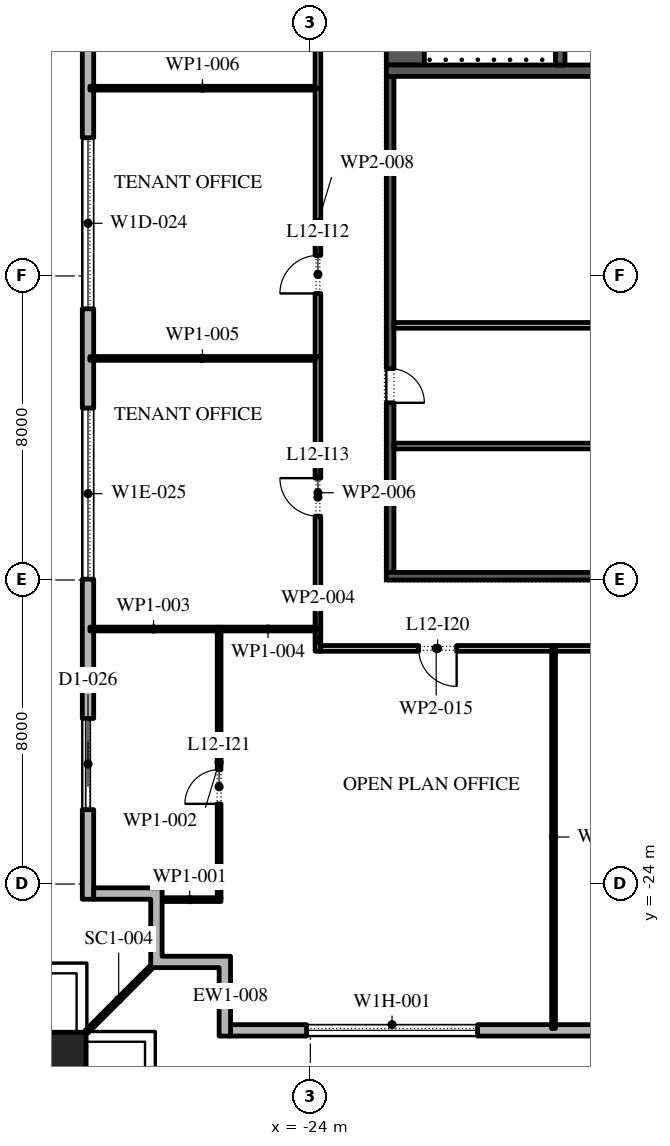
"""IFC4 building model, lengths in metres.
Left out: names, types, materials, properties, quantities, classifications, styles, units other than length and angle.
Written with IfcOpenShell. Run it as: python <this file> out.ifc"""

import sys

from ifc_helpers import new_model, si_unit, direction, frame, frame_2d, origin, origin_2d, place, context, subcontext, project, spatial, polyline, rectangle, outline, extrude, element, fill, save


model = new_model("IFC4")
c1 = context("Model", 3, precision=1e-05, world=origin(), true_north=direction((0.0, 1.0)))
c2 = subcontext(c1, "Body", "Model", "MODEL_VIEW")
j1 = project(units=[si_unit("LENGTHUNIT", "METRE"), si_unit("PLANEANGLEUNIT", "RADIAN")], contexts=[c1])
p1 = place(None, origin())
s1 = spatial("IfcSite", under=j1, at=p1, CompositionType="ELEMENT")
p2 = place(p1, origin())
s2 = spatial("IfcBuilding", under=s1, at=p2, CompositionType="ELEMENT")
p3 = place(p2, frame((0.0, 0.0, 60.6)))
s3 = spatial("IfcBuildingStorey", under=s2, at=p3, CompositionType="ELEMENT", Elevation=60.6)
p4 = place(p3, frame((-30.6, -28.6, 0.0), z_axis=(0.0, 0.0, 1.0), x_axis=(1.0, 0.0, 0.0)))
e1 = element("IfcColumn", 1, at=p4, inside=s3, PredefinedType="COLUMN", context=c2, shape_type="SweptSolid", body=[
    extrude(rectangle(XDim=1.4, YDim=1.4, at=origin_2d()), origin(), (0.0, 0.0, 1.0), 4.2),
])
p5 = place(p3, frame((-26.1, -27.85, 0.0), z_axis=(0.0, 0.0, 1.0), x_axis=(1.0, 0.0, 0.0)))
e2 = element("IfcWall", 2, at=p5, inside=s3, PredefinedType="STANDARD", context=c2, shape_type="SweptSolid", body=[
    extrude(rectangle(XDim=52.5, YDim=0.3, at=frame_2d((26.25, 0.0))), origin(), (0.0, 0.0, 1.0), 4.0),
])
p6 = place(p5, frame((2.0, 0.0, 0.45)))
e3 = element("IfcOpeningElement", 3, at=p6, cuts=e2, PredefinedType="OPENING", context=c2, shape_type="SweptSolid", body=[
    extrude(rectangle(XDim=4.5, YDim=2.75, at=frame_2d((2.25, 1.375))), frame((0.0, 0.16, 0.0), z_axis=(0.0, -1.0, 0.0), x_axis=(1.0, 0.0, 0.0)), (0.0, 0.0, 1.0), 0.32),
])
p7 = place(p5, frame((10.65, 0.0, 0.45)))
e4 = element("IfcOpeningElement", 4, at=p7, cuts=e2, PredefinedType="OPENING", context=c2, shape_type="SweptSolid", body=[
    extrude(rectangle(XDim=4.5, YDim=2.75, at=frame_2d((2.25, 1.375))), frame((0.0, 0.16, 0.0), z_axis=(0.0, -1.0, 0.0), x_axis=(1.0, 0.0, 0.0)), (0.0, 0.0, 1.0), 0.32),
])
p8 = place(p5, frame((20.5, 0.0, 0.0)))
e5 = element("IfcOpeningElement", 5, at=p8, cuts=e2, PredefinedType="OPENING", context=c2, shape_type="SweptSolid", body=[
    extrude(rectangle(XDim=2.4, YDim=3.5, at=frame_2d((1.2, 1.75))), frame((0.0, 0.16, 0.0), z_axis=(0.0, -1.0, 0.0), x_axis=(1.0, 0.0, 0.0)), (0.0, 0.0, 1.0), 0.32),
])
p9 = place(p5, frame((28.25, 0.0, 0.45)))
e6 = element("IfcOpeningElement", 6, at=p9, cuts=e2, PredefinedType="OPENING", context=c2, shape_type="SweptSolid", body=[
    extrude(rectangle(XDim=4.5, YDim=2.75, at=frame_2d((2.25, 1.375))), frame((0.0, 0.16, 0.0), z_axis=(0.0, -1.0, 0.0), x_axis=(1.0, 0.0, 0.0)), (0.0, 0.0, 1.0), 0.32),
])
p10 = place(p5, frame((37.05, 0.0, 0.45)))
e7 = element("IfcOpeningElement", 7, at=p10, cuts=e2, PredefinedType="OPENING", context=c2, shape_type="SweptSolid", body=[
    extrude(rectangle(XDim=4.5, YDim=2.75, at=frame_2d((2.25, 1.375))), frame((0.0, 0.16, 0.0), z_axis=(0.0, -1.0, 0.0), x_axis=(1.0, 0.0, 0.0)), (0.0, 0.0, 1.0), 0.32),
])
p11 = place(p5, frame((45.85, 0.0, 0.45)))
e8 = element("IfcOpeningElement", 8, at=p11, cuts=e2, PredefinedType="OPENING", context=c2, shape_type="SweptSolid", body=[
    extrude(rectangle(XDim=4.5, YDim=2.75, at=frame_2d((2.25, 1.375))), frame((0.0, 0.16, 0.0), z_axis=(0.0, -1.0, 0.0), x_axis=(1.0, 0.0, 0.0)), (0.0, 0.0, 1.0), 0.32),
])
p12 = place(p3, frame((-29.85, 25.1, 0.0), z_axis=(0.0, 0.0, 1.0), x_axis=(0.0, -1.0, 0.0)))
e9 = element("IfcWall", 9, at=p12, inside=s3, PredefinedType="STANDARD", context=c2, shape_type="SweptSolid", body=[
    extrude(rectangle(XDim=49.5, YDim=0.3, at=frame_2d((24.75, 0.0))), origin(), (0.0, 0.0, 1.0), 4.0),
])
p13 = place(p12, frame((1.157, 0.0, 0.45)))
e10 = element("IfcOpeningElement", 10, at=p13, cuts=e9, PredefinedType="OPENING", context=c2, shape_type="SweptSolid", body=[
    extrude(rectangle(XDim=4.5, YDim=2.875, at=frame_2d((2.25, 1.438))), frame((0.0, 0.16, 0.0), z_axis=(0.0, -1.0, 0.0), x_axis=(1.0, 0.0, 0.0)), (0.0, 0.0, 1.0), 0.32),
])
p14 = place(p12, frame((8.121, 0.0, 0.45)))
e11 = element("IfcOpeningElement", 11, at=p14, cuts=e9, PredefinedType="OPENING", context=c2, shape_type="SweptSolid", body=[
    extrude(rectangle(XDim=4.5, YDim=3.05, at=frame_2d((2.25, 1.525))), frame((0.0, 0.16, 0.0), z_axis=(0.0, -1.0, 0.0), x_axis=(1.0, 0.0, 0.0)), (0.0, 0.0, 1.0), 0.32),
])
p15 = place(p12, frame((16.286, 0.0, 0.0)))
e12 = element("IfcOpeningElement", 12, at=p15, cuts=e9, PredefinedType="OPENING", context=c2, shape_type="SweptSolid", body=[
    extrude(rectangle(XDim=2.4, YDim=3.325, at=frame_2d((1.2, 1.663))), frame((0.0, 0.16, 0.0), z_axis=(0.0, -1.0, 0.0), x_axis=(1.0, 0.0, 0.0)), (0.0, 0.0, 1.0), 0.32),
])
p16 = place(p12, frame((22.35, 0.0, 0.45)))
e13 = element("IfcOpeningElement", 13, at=p16, cuts=e9, PredefinedType="OPENING", context=c2, shape_type="SweptSolid", body=[
    extrude(rectangle(XDim=4.5, YDim=2.875, at=frame_2d((2.25, 1.438))), frame((0.0, 0.16, 0.0), z_axis=(0.0, -1.0, 0.0), x_axis=(1.0, 0.0, 0.0)), (0.0, 0.0, 1.0), 0.32),
])
p17 = place(p12, frame((29.464, 0.0, 0.45)))
e14 = element("IfcOpeningElement", 14, at=p17, cuts=e9, PredefinedType="OPENING", context=c2, shape_type="SweptSolid", body=[
    extrude(rectangle(XDim=4.5, YDim=2.875, at=frame_2d((2.25, 1.438))), frame((0.0, 0.16, 0.0), z_axis=(0.0, -1.0, 0.0), x_axis=(1.0, 0.0, 0.0)), (0.0, 0.0, 1.0), 0.32),
])
p18 = place(p12, frame((36.579, 0.0, 0.45)))
e15 = element("IfcOpeningElement", 15, at=p18, cuts=e9, PredefinedType="OPENING", context=c2, shape_type="SweptSolid", body=[
    extrude(rectangle(XDim=4.5, YDim=2.825, at=frame_2d((2.25, 1.413))), frame((0.0, 0.16, 0.0), z_axis=(0.0, -1.0, 0.0), x_axis=(1.0, 0.0, 0.0)), (0.0, 0.0, 1.0), 0.32),
])
p19 = place(p12, frame((44.743, 0.0, 0.0)))
e16 = element("IfcOpeningElement", 16, at=p19, cuts=e9, PredefinedType="OPENING", context=c2, shape_type="SweptSolid", body=[
    extrude(rectangle(XDim=2.4, YDim=3.5, at=frame_2d((1.2, 1.75))), frame((0.0, 0.16, 0.0), z_axis=(0.0, -1.0, 0.0), x_axis=(1.0, 0.0, 0.0)), (0.0, 0.0, 1.0), 0.32),
])
p20 = place(p3, origin())
e17 = element("IfcWall", 17, at=p20, inside=s3, PredefinedType="STANDARD", context=c2, shape_type="SweptSolid", body=[
    extrude(outline(polyline([(-26.4, -26.2), (-28.2, -26.2), (-28.2, -24.4), (-29.7, -24.4), (-29.7, -24.1), (-27.9, -24.1), (-27.9, -25.9), (-26.1, -25.9), (-26.1, -28.0), (-26.4, -28.0), (-26.4, -26.2)])), origin(), (0.0, 0.0, 1.0), 4.0),
])
p21 = place(p3, frame((-28.2, -26.2, -0.05), z_axis=(0.0, 0.0, 1.0), x_axis=(-0.707106781187, -0.707106781187, 0.0)))
e18 = element("IfcWall", 18, at=p21, inside=s3, PredefinedType="STANDARD", context=c2, shape_type="SweptSolid", body=[
    extrude(rectangle(XDim=2.385, YDim=0.1, at=frame_2d((1.192, 0.0))), origin(), (0.0, 0.0, 1.0), 4.05),
])
p22 = place(p3, frame((-21.5, -2.45, 0.0), z_axis=(0.0, 0.0, 1.0), x_axis=(0.0, 1.0, 0.0)))
e19 = element("IfcWall", 19, at=p22, inside=s3, PredefinedType="SHEAR", context=c2, shape_type="SweptSolid", body=[
    extrude(rectangle(XDim=27.9, YDim=1.0, at=frame_2d((13.95, 0.0))), origin(), (0.0, 0.0, 1.0), 4.0),
])
p23 = place(p22, frame((5.05, 0.0, 0.0)))
e20 = element("IfcOpeningElement", 20, at=p23, cuts=e19, PredefinedType="OPENING", context=c2, shape_type="SweptSolid", body=[
    extrude(rectangle(XDim=1.2, YDim=2.1, at=frame_2d((0.6, 1.05))), frame((0.0, 0.51, 0.0), z_axis=(0.0, -1.0, 0.0), x_axis=(1.0, 0.0, 0.0)), (0.0, 0.0, 1.0), 1.02),
])
p24 = place(p22, frame((21.65, 0.0, 0.0)))
e21 = element("IfcOpeningElement", 21, at=p24, cuts=e19, PredefinedType="OPENING", context=c2, shape_type="SweptSolid", body=[
    extrude(rectangle(XDim=1.2, YDim=2.1, at=frame_2d((0.6, 1.05))), frame((0.0, 0.51, 0.0), z_axis=(0.0, -1.0, 0.0), x_axis=(1.0, 0.0, 0.0)), (0.0, 0.0, 1.0), 1.02),
])
p25 = place(p3, frame((-22.0, -2.6, 0.0), z_axis=(0.0, 0.0, 1.0), x_axis=(1.0, 0.0, 0.0)))
e22 = element("IfcWall", 22, at=p25, inside=s3, PredefinedType="SHEAR", context=c2, shape_type="SweptSolid", body=[
    extrude(rectangle(XDim=12.0, YDim=0.3, at=frame_2d((6.0, 0.0))), origin(), (0.0, 0.0, 1.0), 4.0),
])
p26 = place(p3, frame((-17.425, -2.45, 0.0), z_axis=(0.0, 0.0, 1.0), x_axis=(0.0, 1.0, 0.0)))
e23 = element("IfcWall", 23, at=p26, inside=s3, PredefinedType="SHEAR", context=c2, shape_type="SweptSolid", body=[
    extrude(rectangle(XDim=6.3, YDim=0.25, at=frame_2d((3.15, 0.0))), origin(), (0.0, 0.0, 1.0), 4.0),
])
p27 = place(p26, frame((5.05, 0.0, 0.0)))
e24 = element("IfcOpeningElement", 24, at=p27, cuts=e23, PredefinedType="OPENING", context=c2, shape_type="SweptSolid", body=[
    extrude(rectangle(XDim=1.2, YDim=2.1, at=frame_2d((0.6, 1.05))), frame((0.0, 0.135, 0.0), z_axis=(0.0, -1.0, 0.0), x_axis=(1.0, 0.0, 0.0)), (0.0, 0.0, 1.0), 0.27),
])
p28 = place(p3, frame((-21.9, -15.8, 0.0), z_axis=(0.0, 0.0, 1.0), x_axis=(0.0, 1.0, 0.0)))
e25 = element("IfcWall", 25, at=p28, inside=s3, PredefinedType="SHEAR", context=c2, shape_type="SweptSolid", body=[
    extrude(rectangle(XDim=13.05, YDim=0.2, at=frame_2d((6.525, 0.0))), origin(), (0.0, 0.0, 1.0), 4.0),
])
p29 = place(p28, frame((4.462, 0.0, 0.0)))
e26 = element("IfcOpeningElement", 26, at=p29, cuts=e25, PredefinedType="OPENING", context=c2, shape_type="SweptSolid", body=[
    extrude(rectangle(XDim=0.9, YDim=2.1, at=frame_2d((0.45, 1.05))), frame((0.0, 0.11, 0.0), z_axis=(0.0, -1.0, 0.0), x_axis=(1.0, 0.0, 0.0)), (0.0, 0.0, 1.0), 0.22),
])
p30 = place(p3, frame((-22.0, -15.9, 0.0), z_axis=(0.0, 0.0, 1.0), x_axis=(1.0, 0.0, 0.0)))
e27 = element("IfcWall", 27, at=p30, inside=s3, PredefinedType="SHEAR", context=c2, shape_type="SweptSolid", body=[
    extrude(rectangle(XDim=12.0, YDim=0.2, at=frame_2d((6.0, 0.0))), origin(), (0.0, 0.0, 1.0), 4.0),
])
for number, where, z_axis, x_axis in (
    (28, (-21.8, -9.3, 0.0), (0.0, 0.0, 1.0), (1.0, 0.0, 0.0)),
    (29, (-21.8, -12.475, 0.0), (0.0, 0.0, 1.0), (1.0, 0.0, 0.0)),
):
    element("IfcWall", number, at=place(p3, frame(where, z_axis=z_axis, x_axis=x_axis)), inside=s3, PredefinedType="PARTITIONING", context=c2, shape_type="SweptSolid", body=[
        extrude(rectangle(XDim=11.6, YDim=0.15, at=frame_2d((5.8, 0.0))), origin(), (0.0, 0.0, 1.0), 4.0),
    ])
p31 = place(p3, frame((-28.0, -24.41, 0.0), z_axis=(0.0, 0.0, 1.0), x_axis=(1.0, 0.0, 0.0)))
e30 = element("IfcWall", 30, at=p31, inside=s3, PredefinedType="PARTITIONING", context=c2, shape_type="SweptSolid", body=[
    extrude(rectangle(XDim=1.65, YDim=0.1, at=frame_2d((0.825, 0.0))), origin(), (0.0, 0.0, 1.0), 4.0),
])
p32 = place(p3, frame((-26.4, -24.36, 0.0), z_axis=(0.0, 0.0, 1.0), x_axis=(0.0, 1.0, 0.0)))
e31 = element("IfcWall", 31, at=p32, inside=s3, PredefinedType="PARTITIONING", context=c2, shape_type="SweptSolid", body=[
    extrude(rectangle(XDim=7.12, YDim=0.1, at=frame_2d((3.56, 0.0))), origin(), (0.0, 0.0, 1.0), 4.0),
])
p33 = place(p32, frame((2.47, 0.0, 0.0)))
e32 = element("IfcOpeningElement", 32, at=p33, cuts=e31, PredefinedType="OPENING", context=c2, shape_type="SweptSolid", body=[
    extrude(rectangle(XDim=0.9, YDim=2.1, at=frame_2d((0.45, 1.05))), frame((0.0, 0.06, 0.0), z_axis=(0.0, -1.0, 0.0), x_axis=(1.0, 0.0, 0.0)), (0.0, 0.0, 1.0), 0.12),
])
p34 = place(p3, frame((-26.45, -17.29, 0.0), z_axis=(0.0, 0.0, 1.0), x_axis=(-1.0, 0.0, 0.0)))
e33 = element("IfcWall", 33, at=p34, inside=s3, PredefinedType="PARTITIONING", context=c2, shape_type="SweptSolid", body=[
    extrude(rectangle(XDim=3.35, YDim=0.1, at=frame_2d((1.675, 0.0))), origin(), (0.0, 0.0, 1.0), 4.0),
])
p35 = place(p3, frame((-23.8, -17.875, 0.0), z_axis=(0.0, 0.0, 1.0), x_axis=(0.0, 1.0, 0.0)))
e34 = element("IfcWall", 34, at=p35, inside=s3, PredefinedType="PARTITIONING", context=c2, shape_type="SweptSolid", body=[
    extrude(rectangle(XDim=0.585, YDim=0.15, at=frame_2d((0.292, 0.0))), origin(), (0.0, 0.0, 1.0), 4.0),
])
p36 = place(p3, frame((-23.875, -17.29, 0.0), z_axis=(0.0, 0.0, 1.0), x_axis=(-1.0, 0.0, 0.0)))
e35 = element("IfcWall", 35, at=p36, inside=s3, PredefinedType="PARTITIONING", context=c2, shape_type="SweptSolid", body=[
    extrude(rectangle(XDim=2.475, YDim=0.1, at=frame_2d((1.238, 0.0))), origin(), (0.0, 0.0, 1.0), 4.0),
])
p37 = place(p3, frame((-23.8, -17.29, 0.0), z_axis=(0.0, 0.0, 1.0), x_axis=(0.0, 1.0, 0.0)))
e36 = element("IfcWall", 36, at=p37, inside=s3, PredefinedType="PARTITIONING", context=c2, shape_type="SweptSolid", body=[
    extrude(rectangle(XDim=7.17, YDim=0.15, at=frame_2d((3.585, 0.0))), origin(), (0.0, 0.0, 1.0), 4.0),
])
p38 = place(p37, frame((2.97, 0.0, 0.0)))
e37 = element("IfcOpeningElement", 37, at=p38, cuts=e36, PredefinedType="OPENING", context=c2, shape_type="SweptSolid", body=[
    extrude(rectangle(XDim=1.0, YDim=2.1, at=frame_2d((0.5, 1.05))), frame((0.0, 0.085, 0.0), z_axis=(0.0, -1.0, 0.0), x_axis=(1.0, 0.0, 0.0)), (0.0, 0.0, 1.0), 0.17),
])
p39 = place(p3, frame((-23.875, -10.17, 0.0), z_axis=(0.0, 0.0, 1.0), x_axis=(-1.0, 0.0, 0.0)))
e38 = element("IfcWall", 38, at=p39, inside=s3, PredefinedType="PARTITIONING", context=c2, shape_type="SweptSolid", body=[
    extrude(rectangle(XDim=5.925, YDim=0.1, at=frame_2d((2.962, 0.0))), origin(), (0.0, 0.0, 1.0), 4.0),
])
p40 = place(p3, frame((-23.8, -10.12, 0.0), z_axis=(0.0, 0.0, 1.0), x_axis=(0.0, 1.0, 0.0)))
e39 = element("IfcWall", 39, at=p40, inside=s3, PredefinedType="PARTITIONING", context=c2, shape_type="SweptSolid", body=[
    extrude(rectangle(XDim=7.06, YDim=0.15, at=frame_2d((3.53, 0.0))), origin(), (0.0, 0.0, 1.0), 4.0),
])
p41 = place(p40, frame((1.66, 0.0, 0.0)))
e40 = element("IfcOpeningElement", 40, at=p41, cuts=e39, PredefinedType="OPENING", context=c2, shape_type="SweptSolid", body=[
    extrude(rectangle(XDim=1.0, YDim=2.1, at=frame_2d((0.5, 1.05))), frame((0.0, 0.085, 0.0), z_axis=(0.0, -1.0, 0.0), x_axis=(1.0, 0.0, 0.0)), (0.0, 0.0, 1.0), 0.17),
])
p42 = place(p3, frame((-23.875, -3.06, 0.0), z_axis=(0.0, 0.0, 1.0), x_axis=(-1.0, 0.0, 0.0)))
e41 = element("IfcWall", 41, at=p42, inside=s3, PredefinedType="PARTITIONING", context=c2, shape_type="SweptSolid", body=[
    extrude(rectangle(XDim=5.925, YDim=0.1, at=frame_2d((2.962, 0.0))), origin(), (0.0, 0.0, 1.0), 4.0),
])
p43 = place(p3, frame((-23.8, -3.06, 0.0), z_axis=(0.0, 0.0, 1.0), x_axis=(0.0, 1.0, 0.0)))
e42 = element("IfcWall", 42, at=p43, inside=s3, PredefinedType="PARTITIONING", context=c2, shape_type="SweptSolid", body=[
    extrude(rectangle(XDim=14.23, YDim=0.15, at=frame_2d((7.115, 0.0))), origin(), (0.0, 0.0, 1.0), 4.0),
])
p44 = place(p43, frame((8.08, 0.0, 0.0)))
e43 = element("IfcOpeningElement", 43, at=p44, cuts=e42, PredefinedType="OPENING", context=c2, shape_type="SweptSolid", body=[
    extrude(rectangle(XDim=1.0, YDim=2.1, at=frame_2d((0.5, 1.05))), frame((0.0, 0.085, 0.0), z_axis=(0.0, -1.0, 0.0), x_axis=(1.0, 0.0, 0.0)), (0.0, 0.0, 1.0), 0.17),
])
p45 = place(p3, frame((-17.6, -27.8, 0.0), z_axis=(0.0, 0.0, 1.0), x_axis=(0.0, 1.0, 0.0)))
e44 = element("IfcWall", 44, at=p45, inside=s3, PredefinedType="PARTITIONING", context=c2, shape_type="SweptSolid", body=[
    extrude(rectangle(XDim=10.075, YDim=0.1, at=frame_2d((5.038, 0.0))), origin(), (0.0, 0.0, 1.0), 4.0),
])
p46 = place(p3, frame((-17.65, -17.8, 0.0), z_axis=(0.0, 0.0, 1.0), x_axis=(-1.0, 0.0, 0.0)))
e45 = element("IfcWall", 45, at=p46, inside=s3, PredefinedType="PARTITIONING", context=c2, shape_type="SweptSolid", body=[
    extrude(rectangle(XDim=6.075, YDim=0.15, at=frame_2d((3.038, 0.0))), origin(), (0.0, 0.0, 1.0), 4.0),
])
p47 = place(p46, frame((2.5, 0.0, 0.0)))
e46 = element("IfcOpeningElement", 46, at=p47, cuts=e45, PredefinedType="OPENING", context=c2, shape_type="SweptSolid", body=[
    extrude(rectangle(XDim=1.0, YDim=2.1, at=frame_2d((0.5, 1.05))), frame((0.0, 0.085, 0.0), z_axis=(0.0, -1.0, 0.0), x_axis=(1.0, 0.0, 0.0)), (0.0, 0.0, 1.0), 0.17),
])
p48 = place(p3, frame((-8.85, -17.8, 0.0), z_axis=(0.0, 0.0, 1.0), x_axis=(-1.0, 0.0, 0.0)))
e47 = element("IfcWall", 47, at=p48, inside=s3, PredefinedType="PARTITIONING", context=c2, shape_type="SweptSolid", body=[
    extrude(rectangle(XDim=8.7, YDim=0.15, at=frame_2d((4.35, 0.0))), origin(), (0.0, 0.0, 1.0), 4.0),
])
p49 = place(p48, frame((5.6, 0.0, 0.0)))
e48 = element("IfcOpeningElement", 48, at=p49, cuts=e47, PredefinedType="OPENING", context=c2, shape_type="SweptSolid", body=[
    extrude(rectangle(XDim=1.0, YDim=2.1, at=frame_2d((0.5, 1.05))), frame((0.0, 0.085, 0.0), z_axis=(0.0, -1.0, 0.0), x_axis=(1.0, 0.0, 0.0)), (0.0, 0.0, 1.0), 0.17),
])
p50 = place(p6, origin())
e49 = element("IfcWindow", 49, at=p50, inside=s3, PartitioningType="DOUBLE_PANEL_VERTICAL", PredefinedType="WINDOW", context=c2, shape_type="SweptSolid", body=[
    extrude(rectangle(XDim=4.5, YDim=2.75, at=frame_2d((2.25, 1.375))), frame((0.0, 0.03, 0.0), z_axis=(0.0, -1.0, 0.0), x_axis=(1.0, 0.0, 0.0)), (0.0, 0.0, 1.0), 0.06),
])
fill(e3, e49)
p51 = place(p17, origin())
e50 = element("IfcWindow", 50, at=p51, inside=s3, PartitioningType="DOUBLE_PANEL_VERTICAL", PredefinedType="WINDOW", context=c2, shape_type="SweptSolid", body=[
    extrude(rectangle(XDim=4.5, YDim=2.875, at=frame_2d((2.25, 1.438))), frame((0.0, 0.03, 0.0), z_axis=(0.0, -1.0, 0.0), x_axis=(1.0, 0.0, 0.0)), (0.0, 0.0, 1.0), 0.06),
])
fill(e14, e50)
p52 = place(p18, origin())
e51 = element("IfcWindow", 51, at=p52, inside=s3, PartitioningType="DOUBLE_PANEL_VERTICAL", PredefinedType="WINDOW", context=c2, shape_type="SweptSolid", body=[
    extrude(rectangle(XDim=4.5, YDim=2.825, at=frame_2d((2.25, 1.413))), frame((0.0, 0.03, 0.0), z_axis=(0.0, -1.0, 0.0), x_axis=(1.0, 0.0, 0.0)), (0.0, 0.0, 1.0), 0.06),
])
fill(e15, e51)
p53 = place(p19, origin())
e52 = element("IfcDoor", 52, at=p53, inside=s3, OperationType="DOUBLE_DOOR_SLIDING", PredefinedType="DOOR", context=c2, shape_type="SweptSolid", body=[
    extrude(rectangle(XDim=2.4, YDim=3.5, at=frame_2d((1.2, 1.75))), frame((0.0, 0.025, 0.0), z_axis=(0.0, -1.0, 0.0), x_axis=(1.0, 0.0, 0.0)), (0.0, 0.0, 1.0), 0.05),
])
fill(e16, e52)
p54 = place(p29, frame((0.9, -0.15, 0.0), z_axis=(0.0, 0.0, 1.0), x_axis=(-1.0, 0.0, 0.0)))
e53 = element("IfcDoor", 53, at=p54, inside=s3, OperationType="SINGLE_SWING_LEFT", PredefinedType="DOOR", context=c2, shape_type="SweptSolid", body=[
    extrude(rectangle(XDim=0.9, YDim=2.1, at=frame_2d((0.45, 1.05))), frame((0.0, -0.05, 0.0), z_axis=(0.0, -1.0, 0.0), x_axis=(1.0, 0.0, 0.0)), (0.0, 0.0, 1.0), 0.05),
])
fill(e26, e53)
p55 = place(p41, origin())
e54 = element("IfcDoor", 54, at=p55, inside=s3, OperationType="SINGLE_SWING_RIGHT", PredefinedType="DOOR", context=c2, shape_type="SweptSolid", body=[
    extrude(rectangle(XDim=1.0, YDim=2.1, at=frame_2d((0.5, 1.05))), frame((0.0, 0.025, 0.0), z_axis=(0.0, -1.0, 0.0), x_axis=(1.0, 0.0, 0.0)), (0.0, 0.0, 1.0), 0.05),
])
fill(e40, e54)
p56 = place(p38, origin())
e55 = element("IfcDoor", 55, at=p56, inside=s3, OperationType="SINGLE_SWING_LEFT", PredefinedType="DOOR", context=c2, shape_type="SweptSolid", body=[
    extrude(rectangle(XDim=1.0, YDim=2.1, at=frame_2d((0.5, 1.05))), frame((0.0, 0.025, 0.0), z_axis=(0.0, -1.0, 0.0), x_axis=(1.0, 0.0, 0.0)), (0.0, 0.0, 1.0), 0.05),
])
fill(e37, e55)
p57 = place(p47, origin())
e56 = element("IfcDoor", 56, at=p57, inside=s3, OperationType="SINGLE_SWING_RIGHT", PredefinedType="DOOR", context=c2, shape_type="SweptSolid", body=[
    extrude(rectangle(XDim=1.0, YDim=2.1, at=frame_2d((0.5, 1.05))), frame((0.0, 0.025, 0.0), z_axis=(0.0, -1.0, 0.0), x_axis=(1.0, 0.0, 0.0)), (0.0, 0.0, 1.0), 0.05),
])
fill(e46, e56)
p58 = place(p33, origin())
e57 = element("IfcDoor", 57, at=p58, inside=s3, OperationType="SINGLE_SWING_RIGHT", PredefinedType="DOOR", context=c2, shape_type="SweptSolid", body=[
    extrude(rectangle(XDim=0.9, YDim=2.1, at=frame_2d((0.45, 1.05))), frame((0.0, 0.025, 0.0), z_axis=(0.0, -1.0, 0.0), x_axis=(1.0, 0.0, 0.0)), (0.0, 0.0, 1.0), 0.05),
])
fill(e32, e57)
save(model, sys.argv[1])
